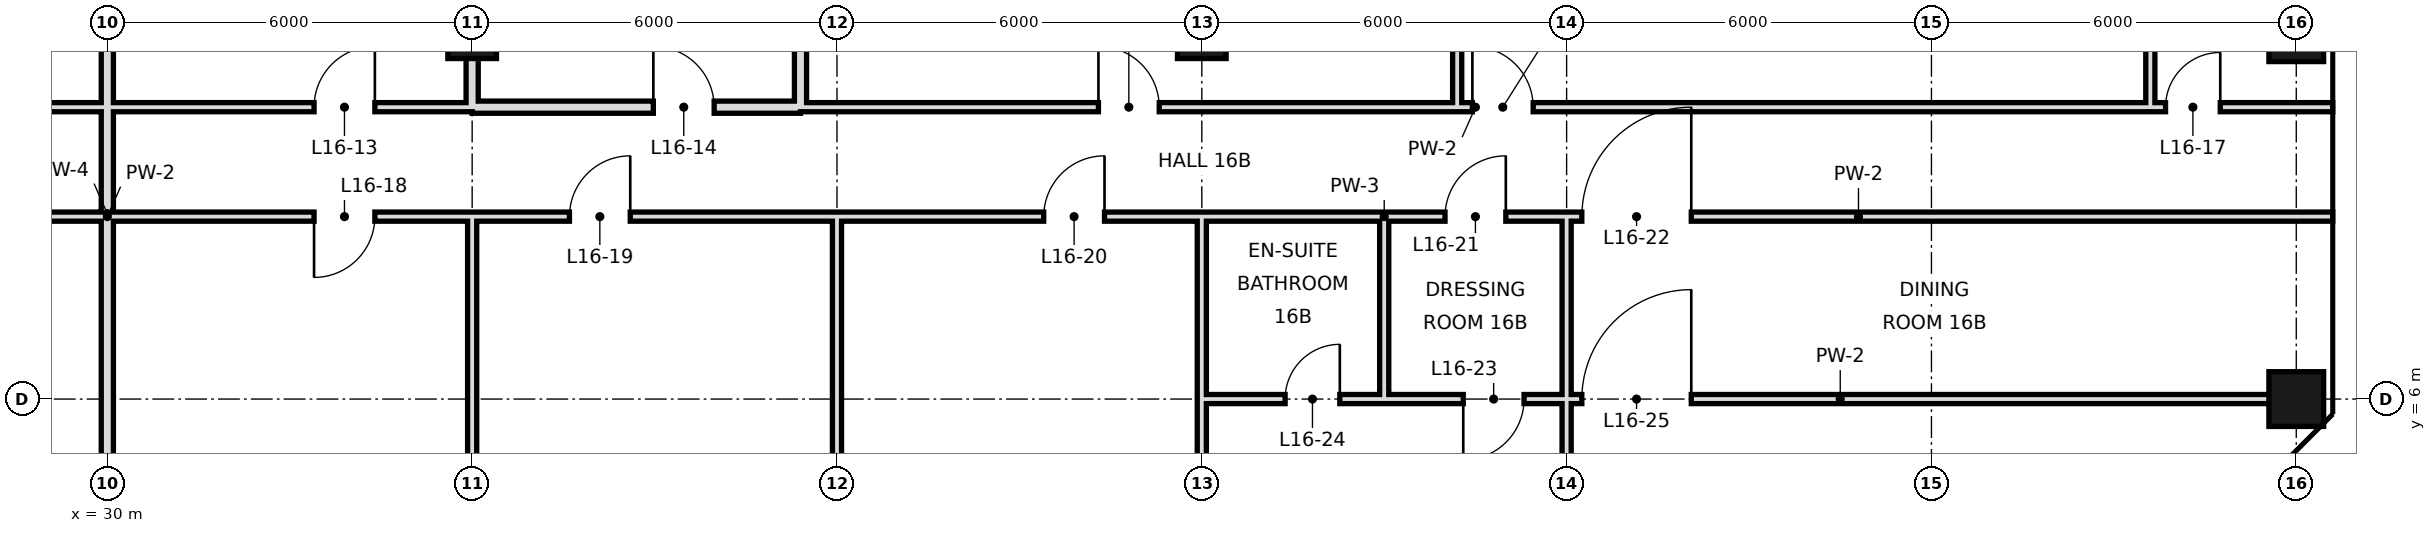
"""IFC4 building model, lengths in metres.
Left out: names, types, materials, properties, quantities, classifications, styles, units other than length and angle.
Written with IfcOpenShell. Run it as: python <this file> out.ifc"""

import sys

from ifc_helpers import new_model, si_unit, direction, frame, frame_2d, origin, origin_2d, place, context, subcontext, project, spatial, rectangle, hollow_rectangle, extrude, element, fill, save


model = new_model("IFC4")
c1 = context("Model", 3, precision=1e-05, world=origin(), true_north=direction((0.0, 1.0)))
c2 = subcontext(c1, "Body", "Model", "MODEL_VIEW")
j1 = project(units=[si_unit("LENGTHUNIT", "METRE"), si_unit("PLANEANGLEUNIT", "RADIAN")], contexts=[c1])
p1 = place(None, origin())
s1 = spatial("IfcSite", under=j1, at=p1, CompositionType="ELEMENT")
p2 = place(p1, origin())
s2 = spatial("IfcBuilding", under=s1, at=p2, CompositionType="ELEMENT")
p3 = place(p2, frame((0.0, 0.0, 78.6)))
s3 = spatial("IfcBuildingStorey", under=s2, at=p3, CompositionType="ELEMENT", Elevation=78.6)
for number, where, z_axis, x_axis in (
    (1, (36.0, 12.0, 0.0), (0.0, 0.0, 1.0), (1.0, 0.0, 0.0)),
    (2, (48.0, 12.0, 0.0), (0.0, 0.0, 1.0), (1.0, 0.0, 0.0)),
):
    element("IfcColumn", number, at=place(p3, frame(where, z_axis=z_axis, x_axis=x_axis)), inside=s3, PredefinedType="COLUMN", context=c2, shape_type="SweptSolid", body=[
        extrude(hollow_rectangle(XDim=0.8, YDim=0.8, WallThickness=0.04, at=origin_2d()), origin(), (0.0, 0.0, 1.0), 3.6),
    ])
for number, where, z_axis, x_axis in (
    (3, (66.0, 6.0, 0.0), (0.0, 0.0, 1.0), (1.0, 0.0, 0.0)),
    (4, (66.0, 12.0, 0.0), (0.0, 0.0, 1.0), (1.0, 0.0, 0.0)),
):
    element("IfcColumn", number, at=place(p3, frame(where, z_axis=z_axis, x_axis=x_axis)), inside=s3, PredefinedType="COLUMN", context=c2, shape_type="SweptSolid", body=[
        extrude(hollow_rectangle(XDim=0.9, YDim=0.9, WallThickness=0.045, at=origin_2d()), origin(), (0.0, 0.0, 1.0), 3.6),
    ])
p4 = place(p3, frame((30.0, -0.6, 0.0), z_axis=(0.0, 0.0, 1.0), x_axis=(0.0, 1.0, 0.0)))
e5 = element("IfcWall", 5, at=p4, inside=s3, PredefinedType="SOLIDWALL", context=c2, shape_type="SweptSolid", body=[
    extrude(rectangle(XDim=19.3, YDim=0.2, at=frame_2d((9.65, 0.0))), origin(), (0.0, 0.0, 1.0), 2.72),
])
p5 = place(p3, frame((36.0, 10.8, 0.0), z_axis=(0.0, 0.0, 1.0), x_axis=(0.0, 1.0, 0.0)))
e6 = element("IfcWall", 6, at=p5, inside=s3, PredefinedType="SOLIDWALL", context=c2, shape_type="SweptSolid", body=[
    extrude(rectangle(XDim=7.9, YDim=0.2, at=frame_2d((3.95, 0.0))), origin(), (0.0, 0.0, 1.0), 2.72),
])
p6 = place(p3, frame((36.0, 0.0, 0.0), z_axis=(0.0, 0.0, 1.0), x_axis=(0.0, 1.0, 0.0)))
e7 = element("IfcWall", 7, at=p6, inside=s3, PredefinedType="PARTITIONING", context=c2, shape_type="SweptSolid", body=[
    extrude(rectangle(XDim=9.0, YDim=0.15, at=frame_2d((4.5, 0.0))), origin(), (0.0, 0.0, 1.0), 2.72),
])
p7 = place(p3, frame((41.4, 10.8, 0.0), z_axis=(0.0, 0.0, 1.0), x_axis=(0.0, 1.0, 0.0)))
e8 = element("IfcWall", 8, at=p7, inside=s3, PredefinedType="SOLIDWALL", context=c2, shape_type="SweptSolid", body=[
    extrude(rectangle(XDim=7.9, YDim=0.2, at=frame_2d((3.95, 0.0))), origin(), (0.0, 0.0, 1.0), 2.72),
])
p8 = place(p3, frame((42.0, -0.6, 0.0), z_axis=(0.0, 0.0, 1.0), x_axis=(0.0, 1.0, 0.0)))
e9 = element("IfcWall", 9, at=p8, inside=s3, PredefinedType="PARTITIONING", context=c2, shape_type="SweptSolid", body=[
    extrude(rectangle(XDim=9.6, YDim=0.15, at=frame_2d((4.8, 0.0))), origin(), (0.0, 0.0, 1.0), 2.72),
])
p9 = place(p3, frame((48.0, 0.0, 0.0), z_axis=(0.0, 0.0, 1.0), x_axis=(0.0, 1.0, 0.0)))
e10 = element("IfcWall", 10, at=p9, inside=s3, PredefinedType="PARTITIONING", context=c2, shape_type="SweptSolid", body=[
    extrude(rectangle(XDim=6.0, YDim=0.15, at=frame_2d((3.0, 0.0))), origin(), (0.0, 0.0, 1.0), 2.72),
])
p10 = place(p3, frame((48.0, 6.0, 0.0), z_axis=(0.0, 0.0, 1.0), x_axis=(0.0, 1.0, 0.0)))
e11 = element("IfcWall", 11, at=p10, inside=s3, PredefinedType="PARTITIONING", context=c2, shape_type="SweptSolid", body=[
    extrude(rectangle(XDim=3.0, YDim=0.15, at=frame_2d((1.5, 0.0))), origin(), (0.0, 0.0, 1.0), 2.72),
])
p11 = place(p3, frame((51.0, 6.0, 0.0), z_axis=(0.0, 0.0, 1.0), x_axis=(0.0, 1.0, 0.0)))
e12 = element("IfcWall", 12, at=p11, inside=s3, PredefinedType="PARTITIONING", context=c2, shape_type="SweptSolid", body=[
    extrude(rectangle(XDim=3.0, YDim=0.15, at=frame_2d((1.5, 0.0))), origin(), (0.0, 0.0, 1.0), 3.42),
])
p12 = place(p3, frame((52.2, 10.8, 0.0), z_axis=(0.0, 0.0, 1.0), x_axis=(0.0, 1.0, 0.0)))
e13 = element("IfcWall", 13, at=p12, inside=s3, PredefinedType="PARTITIONING", context=c2, shape_type="SweptSolid", body=[
    extrude(rectangle(XDim=7.2, YDim=0.15, at=frame_2d((3.6, 0.0))), origin(), (0.0, 0.0, 1.0), 3.42),
])
p13 = place(p3, frame((54.0, -0.6, 0.0), z_axis=(0.0, 0.0, 1.0), x_axis=(0.0, 1.0, 0.0)))
e14 = element("IfcWall", 14, at=p13, inside=s3, PredefinedType="PARTITIONING", context=c2, shape_type="SweptSolid", body=[
    extrude(rectangle(XDim=9.6, YDim=0.15, at=frame_2d((4.8, 0.0))), origin(), (0.0, 0.0, 1.0), 3.42),
])
p14 = place(p3, frame((63.6, 10.8, 0.0), z_axis=(0.0, 0.0, 1.0), x_axis=(0.0, 1.0, 0.0)))
e15 = element("IfcWall", 15, at=p14, inside=s3, PredefinedType="PARTITIONING", context=c2, shape_type="SweptSolid", body=[
    extrude(rectangle(XDim=7.2, YDim=0.15, at=frame_2d((3.6, 0.0))), origin(), (0.0, 0.0, 1.0), 3.42),
])
p15 = place(p3, frame((36.0, 10.8, 0.0), z_axis=(0.0, 0.0, 1.0), x_axis=(1.0, 0.0, 0.0)))
e16 = element("IfcWall", 16, at=p15, inside=s3, PredefinedType="SOLIDWALL", context=c2, shape_type="SweptSolid", body=[
    extrude(rectangle(XDim=5.4, YDim=0.2, at=frame_2d((2.7, 0.0))), origin(), (0.0, 0.0, 1.0), 2.72),
])
p16 = place(p15, frame((2.98, 0.0, 0.0)))
e17 = element("IfcOpeningElement", 17, at=p16, cuts=e16, PredefinedType="OPENING", context=c2, shape_type="SweptSolid", body=[
    extrude(rectangle(XDim=1.0, YDim=2.4, at=frame_2d((0.5, 1.2))), frame((0.0, 0.11, 0.0), z_axis=(0.0, -1.0, 0.0), x_axis=(1.0, 0.0, 0.0)), (0.0, 0.0, 1.0), 0.22),
])
p17 = place(p3, frame((6.6, 10.8, 0.0), z_axis=(0.0, 0.0, 1.0), x_axis=(1.0, 0.0, 0.0)))
e18 = element("IfcWall", 18, at=p17, inside=s3, PredefinedType="PARTITIONING", context=c2, shape_type="SweptSolid", body=[
    extrude(rectangle(XDim=29.4, YDim=0.15, at=frame_2d((14.7, 0.0))), origin(), (0.0, 0.0, 1.0), 3.42),
])
p18 = place(p17, frame((2.5, 0.0, 0.0)))
e19 = element("IfcOpeningElement", 19, at=p18, cuts=e18, PredefinedType="OPENING", context=c2, shape_type="SweptSolid", body=[
    extrude(rectangle(XDim=1.0, YDim=2.4, at=frame_2d((0.5, 1.2))), frame((0.0, 0.085, 0.0), z_axis=(0.0, -1.0, 0.0), x_axis=(1.0, 0.0, 0.0)), (0.0, 0.0, 1.0), 0.17),
])
p19 = place(p17, frame((7.96, 0.0, 0.0)))
e20 = element("IfcOpeningElement", 20, at=p19, cuts=e18, PredefinedType="OPENING", context=c2, shape_type="SweptSolid", body=[
    extrude(rectangle(XDim=1.0, YDim=2.4, at=frame_2d((0.5, 1.2))), frame((0.0, 0.085, 0.0), z_axis=(0.0, -1.0, 0.0), x_axis=(1.0, 0.0, 0.0)), (0.0, 0.0, 1.0), 0.17),
])
p20 = place(p17, frame((19.54, 0.0, 0.0)))
e21 = element("IfcOpeningElement", 21, at=p20, cuts=e18, PredefinedType="OPENING", context=c2, shape_type="SweptSolid", body=[
    extrude(rectangle(XDim=1.0, YDim=2.4, at=frame_2d((0.5, 1.2))), frame((0.0, 0.085, 0.0), z_axis=(0.0, -1.0, 0.0), x_axis=(1.0, 0.0, 0.0)), (0.0, 0.0, 1.0), 0.17),
])
p21 = place(p17, frame((26.8, 0.0, 0.0)))
e22 = element("IfcOpeningElement", 22, at=p21, cuts=e18, PredefinedType="OPENING", context=c2, shape_type="SweptSolid", body=[
    extrude(rectangle(XDim=1.0, YDim=2.4, at=frame_2d((0.5, 1.2))), frame((0.0, 0.085, 0.0), z_axis=(0.0, -1.0, 0.0), x_axis=(1.0, 0.0, 0.0)), (0.0, 0.0, 1.0), 0.17),
])
p22 = place(p3, frame((41.4, 10.8, 0.0), z_axis=(0.0, 0.0, 1.0), x_axis=(1.0, 0.0, 0.0)))
e23 = element("IfcWall", 23, at=p22, inside=s3, PredefinedType="PARTITIONING", context=c2, shape_type="SweptSolid", body=[
    extrude(rectangle(XDim=22.2, YDim=0.15, at=frame_2d((11.1, 0.0))), origin(), (0.0, 0.0, 1.0), 3.42),
])
p23 = place(p22, frame((4.9, 0.0, 0.0)))
e24 = element("IfcOpeningElement", 24, at=p23, cuts=e23, PredefinedType="OPENING", context=c2, shape_type="SweptSolid", body=[
    extrude(rectangle(XDim=1.0, YDim=2.4, at=frame_2d((0.5, 1.2))), frame((0.0, 0.085, 0.0), z_axis=(0.0, -1.0, 0.0), x_axis=(1.0, 0.0, 0.0)), (0.0, 0.0, 1.0), 0.17),
])
p24 = place(p22, frame((11.05, 0.0, 0.0)))
e25 = element("IfcOpeningElement", 25, at=p24, cuts=e23, PredefinedType="OPENING", context=c2, shape_type="SweptSolid", body=[
    extrude(rectangle(XDim=1.0, YDim=2.4, at=frame_2d((0.5, 1.2))), frame((0.0, 0.085, 0.0), z_axis=(0.0, -1.0, 0.0), x_axis=(1.0, 0.0, 0.0)), (0.0, 0.0, 1.0), 0.17),
])
p25 = place(p3, frame((63.6, 10.8, 0.0), z_axis=(0.0, 0.0, 1.0), x_axis=(1.0, 0.0, 0.0)))
e26 = element("IfcWall", 26, at=p25, inside=s3, PredefinedType="PARTITIONING", context=c2, shape_type="SweptSolid", body=[
    extrude(rectangle(XDim=3.0, YDim=0.15, at=frame_2d((1.5, 0.0))), origin(), (0.0, 0.0, 1.0), 3.42),
])
p26 = place(p25, frame((0.25, 0.0, 0.0)))
e27 = element("IfcOpeningElement", 27, at=p26, cuts=e26, PredefinedType="OPENING", context=c2, shape_type="SweptSolid", body=[
    extrude(rectangle(XDim=0.9, YDim=2.4, at=frame_2d((0.45, 1.2))), frame((0.0, 0.085, 0.0), z_axis=(0.0, -1.0, 0.0), x_axis=(1.0, 0.0, 0.0)), (0.0, 0.0, 1.0), 0.17),
])
p27 = place(p3, frame((51.0, 6.0, 0.0), z_axis=(0.0, 0.0, 1.0), x_axis=(1.0, 0.0, 0.0)))
e28 = element("IfcWall", 28, at=p27, inside=s3, PredefinedType="PARTITIONING", context=c2, shape_type="SweptSolid", body=[
    extrude(rectangle(XDim=15.0, YDim=0.15, at=frame_2d((7.5, 0.0))), origin(), (0.0, 0.0, 1.0), 2.52),
])
p28 = place(p27, frame((1.3, 0.0, 0.0)))
e29 = element("IfcOpeningElement", 29, at=p28, cuts=e28, PredefinedType="OPENING", context=c2, shape_type="SweptSolid", body=[
    extrude(rectangle(XDim=1.0, YDim=2.4, at=frame_2d((0.5, 1.2))), frame((0.0, 0.085, 0.0), z_axis=(0.0, -1.0, 0.0), x_axis=(1.0, 0.0, 0.0)), (0.0, 0.0, 1.0), 0.17),
])
p29 = place(p27, frame((3.25, 0.0, 0.0)))
e30 = element("IfcOpeningElement", 30, at=p29, cuts=e28, PredefinedType="OPENING", context=c2, shape_type="SweptSolid", body=[
    extrude(rectangle(XDim=1.8, YDim=2.4, at=frame_2d((0.9, 1.2))), frame((0.0, 0.085, 0.0), z_axis=(0.0, -1.0, 0.0), x_axis=(1.0, 0.0, 0.0)), (0.0, 0.0, 1.0), 0.17),
])
p30 = place(p3, frame((48.0, 6.0, 0.0), z_axis=(0.0, 0.0, 1.0), x_axis=(1.0, 0.0, 0.0)))
e31 = element("IfcWall", 31, at=p30, inside=s3, PredefinedType="PARTITIONING", context=c2, shape_type="SweptSolid", body=[
    extrude(rectangle(XDim=3.0, YDim=0.15, at=frame_2d((1.5, 0.0))), origin(), (0.0, 0.0, 1.0), 2.52),
])
p31 = place(p30, frame((1.37, 0.0, 0.0)))
e32 = element("IfcOpeningElement", 32, at=p31, cuts=e31, PredefinedType="OPENING", context=c2, shape_type="SweptSolid", body=[
    extrude(rectangle(XDim=0.9, YDim=2.4, at=frame_2d((0.45, 1.2))), frame((0.0, 0.085, 0.0), z_axis=(0.0, -1.0, 0.0), x_axis=(1.0, 0.0, 0.0)), (0.0, 0.0, 1.0), 0.17),
])
p32 = place(p3, frame((12.0, 9.0, 0.0), z_axis=(0.0, 0.0, 1.0), x_axis=(1.0, 0.0, 0.0)))
e33 = element("IfcWall", 33, at=p32, inside=s3, PredefinedType="PARTITIONING", context=c2, shape_type="SweptSolid", body=[
    extrude(rectangle(XDim=36.0, YDim=0.15, at=frame_2d((18.0, 0.0))), origin(), (0.0, 0.0, 1.0), 3.42),
])
p33 = place(p32, frame((5.1, 0.0, 0.0)))
e34 = element("IfcOpeningElement", 34, at=p33, cuts=e33, PredefinedType="OPENING", context=c2, shape_type="SweptSolid", body=[
    extrude(rectangle(XDim=1.8, YDim=2.4, at=frame_2d((0.9, 1.2))), frame((0.0, 0.085, 0.0), z_axis=(0.0, -1.0, 0.0), x_axis=(1.0, 0.0, 0.0)), (0.0, 0.0, 1.0), 0.17),
])
p34 = place(p32, frame((13.6, 0.0, 0.0)))
e35 = element("IfcOpeningElement", 35, at=p34, cuts=e33, PredefinedType="OPENING", context=c2, shape_type="SweptSolid", body=[
    extrude(rectangle(XDim=1.0, YDim=2.4, at=frame_2d((0.5, 1.2))), frame((0.0, 0.085, 0.0), z_axis=(0.0, -1.0, 0.0), x_axis=(1.0, 0.0, 0.0)), (0.0, 0.0, 1.0), 0.17),
])
p35 = place(p32, frame((21.4, 0.0, 0.0)))
e36 = element("IfcOpeningElement", 36, at=p35, cuts=e33, PredefinedType="OPENING", context=c2, shape_type="SweptSolid", body=[
    extrude(rectangle(XDim=1.0, YDim=2.4, at=frame_2d((0.5, 1.2))), frame((0.0, 0.085, 0.0), z_axis=(0.0, -1.0, 0.0), x_axis=(1.0, 0.0, 0.0)), (0.0, 0.0, 1.0), 0.17),
])
p36 = place(p32, frame((25.6, 0.0, 0.0)))
e37 = element("IfcOpeningElement", 37, at=p36, cuts=e33, PredefinedType="OPENING", context=c2, shape_type="SweptSolid", body=[
    extrude(rectangle(XDim=1.0, YDim=2.4, at=frame_2d((0.5, 1.2))), frame((0.0, 0.085, 0.0), z_axis=(0.0, -1.0, 0.0), x_axis=(1.0, 0.0, 0.0)), (0.0, 0.0, 1.0), 0.17),
])
p37 = place(p32, frame((33.4, 0.0, 0.0)))
e38 = element("IfcOpeningElement", 38, at=p37, cuts=e33, PredefinedType="OPENING", context=c2, shape_type="SweptSolid", body=[
    extrude(rectangle(XDim=1.0, YDim=2.4, at=frame_2d((0.5, 1.2))), frame((0.0, 0.085, 0.0), z_axis=(0.0, -1.0, 0.0), x_axis=(1.0, 0.0, 0.0)), (0.0, 0.0, 1.0), 0.17),
])
p38 = place(p3, frame((51.0, 9.0, 0.0), z_axis=(0.0, 0.0, 1.0), x_axis=(1.0, 0.0, 0.0)))
e39 = element("IfcWall", 39, at=p38, inside=s3, PredefinedType="PARTITIONING", context=c2, shape_type="SweptSolid", body=[
    extrude(rectangle(XDim=15.6, YDim=0.15, at=frame_2d((7.8, 0.0))), origin(), (0.0, 0.0, 1.0), 3.42),
])
p39 = place(p38, frame((1.0, 0.0, 0.0)))
e40 = element("IfcOpeningElement", 40, at=p39, cuts=e39, PredefinedType="OPENING", context=c2, shape_type="SweptSolid", body=[
    extrude(rectangle(XDim=1.0, YDim=2.4, at=frame_2d((0.5, 1.2))), frame((0.0, 0.085, 0.0), z_axis=(0.0, -1.0, 0.0), x_axis=(1.0, 0.0, 0.0)), (0.0, 0.0, 1.0), 0.17),
])
p40 = place(p38, frame((3.25, 0.0, 0.0)))
e41 = element("IfcOpeningElement", 41, at=p40, cuts=e39, PredefinedType="OPENING", context=c2, shape_type="SweptSolid", body=[
    extrude(rectangle(XDim=1.8, YDim=2.4, at=frame_2d((0.9, 1.2))), frame((0.0, 0.085, 0.0), z_axis=(0.0, -1.0, 0.0), x_axis=(1.0, 0.0, 0.0)), (0.0, 0.0, 1.0), 0.17),
])
p41 = place(p3, frame((48.0, 9.0, 0.0), z_axis=(0.0, 0.0, 1.0), x_axis=(1.0, 0.0, 0.0)))
e42 = element("IfcWall", 42, at=p41, inside=s3, PredefinedType="PARTITIONING", context=c2, shape_type="SweptSolid", body=[
    extrude(rectangle(XDim=3.0, YDim=0.15, at=frame_2d((1.5, 0.0))), origin(), (0.0, 0.0, 1.0), 3.42),
])
p42 = place(p21, frame((1.0, 0.0, 0.0), z_axis=(0.0, 0.0, 1.0), x_axis=(-1.0, 0.0, 0.0)))
e43 = element("IfcDoor", 43, at=p42, inside=s3, OperationType="SINGLE_SWING_LEFT", PredefinedType="DOOR", context=c2, shape_type="SweptSolid", body=[
    extrude(rectangle(XDim=1.0, YDim=2.4, at=frame_2d((0.5, 1.2))), frame((0.0, 0.025, 0.0), z_axis=(0.0, -1.0, 0.0), x_axis=(1.0, 0.0, 0.0)), (0.0, 0.0, 1.0), 0.05),
])
fill(e22, e43)
p43 = place(p16, origin())
e44 = element("IfcDoor", 44, at=p43, inside=s3, OperationType="SINGLE_SWING_LEFT", PredefinedType="DOOR", context=c2, shape_type="SweptSolid", body=[
    extrude(rectangle(XDim=1.0, YDim=2.4, at=frame_2d((0.5, 1.2))), frame((0.0, 0.025, 0.0), z_axis=(0.0, -1.0, 0.0), x_axis=(1.0, 0.0, 0.0)), (0.0, 0.0, 1.0), 0.05),
])
fill(e17, e44)
p44 = place(p23, origin())
e45 = element("IfcDoor", 45, at=p44, inside=s3, OperationType="SINGLE_SWING_LEFT", PredefinedType="DOOR", context=c2, shape_type="SweptSolid", body=[
    extrude(rectangle(XDim=1.0, YDim=2.4, at=frame_2d((0.5, 1.2))), frame((0.0, 0.025, 0.0), z_axis=(0.0, -1.0, 0.0), x_axis=(1.0, 0.0, 0.0)), (0.0, 0.0, 1.0), 0.05),
])
fill(e24, e45)
p45 = place(p24, origin())
e46 = element("IfcDoor", 46, at=p45, inside=s3, OperationType="SINGLE_SWING_LEFT", PredefinedType="DOOR", context=c2, shape_type="SweptSolid", body=[
    extrude(rectangle(XDim=1.0, YDim=2.4, at=frame_2d((0.5, 1.2))), frame((0.0, 0.025, 0.0), z_axis=(0.0, -1.0, 0.0), x_axis=(1.0, 0.0, 0.0)), (0.0, 0.0, 1.0), 0.05),
])
fill(e25, e46)
p46 = place(p26, frame((0.9, 0.0, 0.0), z_axis=(0.0, 0.0, 1.0), x_axis=(-1.0, 0.0, 0.0)))
e47 = element("IfcDoor", 47, at=p46, inside=s3, OperationType="SINGLE_SWING_LEFT", PredefinedType="DOOR", context=c2, shape_type="SweptSolid", body=[
    extrude(rectangle(XDim=0.9, YDim=2.4, at=frame_2d((0.45, 1.2))), frame((0.0, 0.025, 0.0), z_axis=(0.0, -1.0, 0.0), x_axis=(1.0, 0.0, 0.0)), (0.0, 0.0, 1.0), 0.05),
])
fill(e27, e47)
p47 = place(p35, frame((1.0, 0.0, 0.0), z_axis=(0.0, 0.0, 1.0), x_axis=(-1.0, 0.0, 0.0)))
e48 = element("IfcDoor", 48, at=p47, inside=s3, OperationType="SINGLE_SWING_RIGHT", PredefinedType="DOOR", context=c2, shape_type="SweptSolid", body=[
    extrude(rectangle(XDim=1.0, YDim=2.4, at=frame_2d((0.5, 1.2))), frame((0.0, 0.025, 0.0), z_axis=(0.0, -1.0, 0.0), x_axis=(1.0, 0.0, 0.0)), (0.0, 0.0, 1.0), 0.05),
])
fill(e36, e48)
p48 = place(p36, frame((1.0, 0.0, 0.0), z_axis=(0.0, 0.0, 1.0), x_axis=(-1.0, 0.0, 0.0)))
e49 = element("IfcDoor", 49, at=p48, inside=s3, OperationType="SINGLE_SWING_LEFT", PredefinedType="DOOR", context=c2, shape_type="SweptSolid", body=[
    extrude(rectangle(XDim=1.0, YDim=2.4, at=frame_2d((0.5, 1.2))), frame((0.0, 0.025, 0.0), z_axis=(0.0, -1.0, 0.0), x_axis=(1.0, 0.0, 0.0)), (0.0, 0.0, 1.0), 0.05),
])
fill(e37, e49)
p49 = place(p37, frame((1.0, 0.0, 0.0), z_axis=(0.0, 0.0, 1.0), x_axis=(-1.0, 0.0, 0.0)))
e50 = element("IfcDoor", 50, at=p49, inside=s3, OperationType="SINGLE_SWING_LEFT", PredefinedType="DOOR", context=c2, shape_type="SweptSolid", body=[
    extrude(rectangle(XDim=1.0, YDim=2.4, at=frame_2d((0.5, 1.2))), frame((0.0, 0.025, 0.0), z_axis=(0.0, -1.0, 0.0), x_axis=(1.0, 0.0, 0.0)), (0.0, 0.0, 1.0), 0.05),
])
fill(e38, e50)
p50 = place(p39, frame((1.0, 0.0, 0.0), z_axis=(0.0, 0.0, 1.0), x_axis=(-1.0, 0.0, 0.0)))
e51 = element("IfcDoor", 51, at=p50, inside=s3, OperationType="SINGLE_SWING_LEFT", PredefinedType="DOOR", context=c2, shape_type="SweptSolid", body=[
    extrude(rectangle(XDim=1.0, YDim=2.4, at=frame_2d((0.5, 1.2))), frame((0.0, 0.025, 0.0), z_axis=(0.0, -1.0, 0.0), x_axis=(1.0, 0.0, 0.0)), (0.0, 0.0, 1.0), 0.05),
])
fill(e40, e51)
p51 = place(p40, frame((1.8, 0.0, 0.0), z_axis=(0.0, 0.0, 1.0), x_axis=(-1.0, 0.0, 0.0)))
e52 = element("IfcDoor", 52, at=p51, inside=s3, OperationType="SINGLE_SWING_LEFT", PredefinedType="DOOR", context=c2, shape_type="SweptSolid", body=[
    extrude(rectangle(XDim=1.8, YDim=2.4, at=frame_2d((0.9, 1.2))), frame((0.0, 0.025, 0.0), z_axis=(0.0, -1.0, 0.0), x_axis=(1.0, 0.0, 0.0)), (0.0, 0.0, 1.0), 0.05),
])
fill(e41, e52)
p52 = place(p28, frame((1.0, 0.0, 0.0), z_axis=(0.0, 0.0, 1.0), x_axis=(-1.0, 0.0, 0.0)))
e53 = element("IfcDoor", 53, at=p52, inside=s3, OperationType="SINGLE_SWING_RIGHT", PredefinedType="DOOR", context=c2, shape_type="SweptSolid", body=[
    extrude(rectangle(XDim=1.0, YDim=2.4, at=frame_2d((0.5, 1.2))), frame((0.0, 0.025, 0.0), z_axis=(0.0, -1.0, 0.0), x_axis=(1.0, 0.0, 0.0)), (0.0, 0.0, 1.0), 0.05),
])
fill(e29, e53)
p53 = place(p31, frame((0.9, 0.0, 0.0), z_axis=(0.0, 0.0, 1.0), x_axis=(-1.0, 0.0, 0.0)))
e54 = element("IfcDoor", 54, at=p53, inside=s3, OperationType="SINGLE_SWING_LEFT", PredefinedType="DOOR", context=c2, shape_type="SweptSolid", body=[
    extrude(rectangle(XDim=0.9, YDim=2.4, at=frame_2d((0.45, 1.2))), frame((0.0, 0.025, 0.0), z_axis=(0.0, -1.0, 0.0), x_axis=(1.0, 0.0, 0.0)), (0.0, 0.0, 1.0), 0.05),
])
fill(e32, e54)
p54 = place(p29, frame((1.8, 0.0, 0.0), z_axis=(0.0, 0.0, 1.0), x_axis=(-1.0, 0.0, 0.0)))
e55 = element("IfcDoor", 55, at=p54, inside=s3, OperationType="SINGLE_SWING_LEFT", PredefinedType="DOOR", context=c2, shape_type="SweptSolid", body=[
    extrude(rectangle(XDim=1.8, YDim=2.4, at=frame_2d((0.9, 1.2))), frame((0.0, 0.025, 0.0), z_axis=(0.0, -1.0, 0.0), x_axis=(1.0, 0.0, 0.0)), (0.0, 0.0, 1.0), 0.05),
])
fill(e30, e55)
save(model, sys.argv[1])
